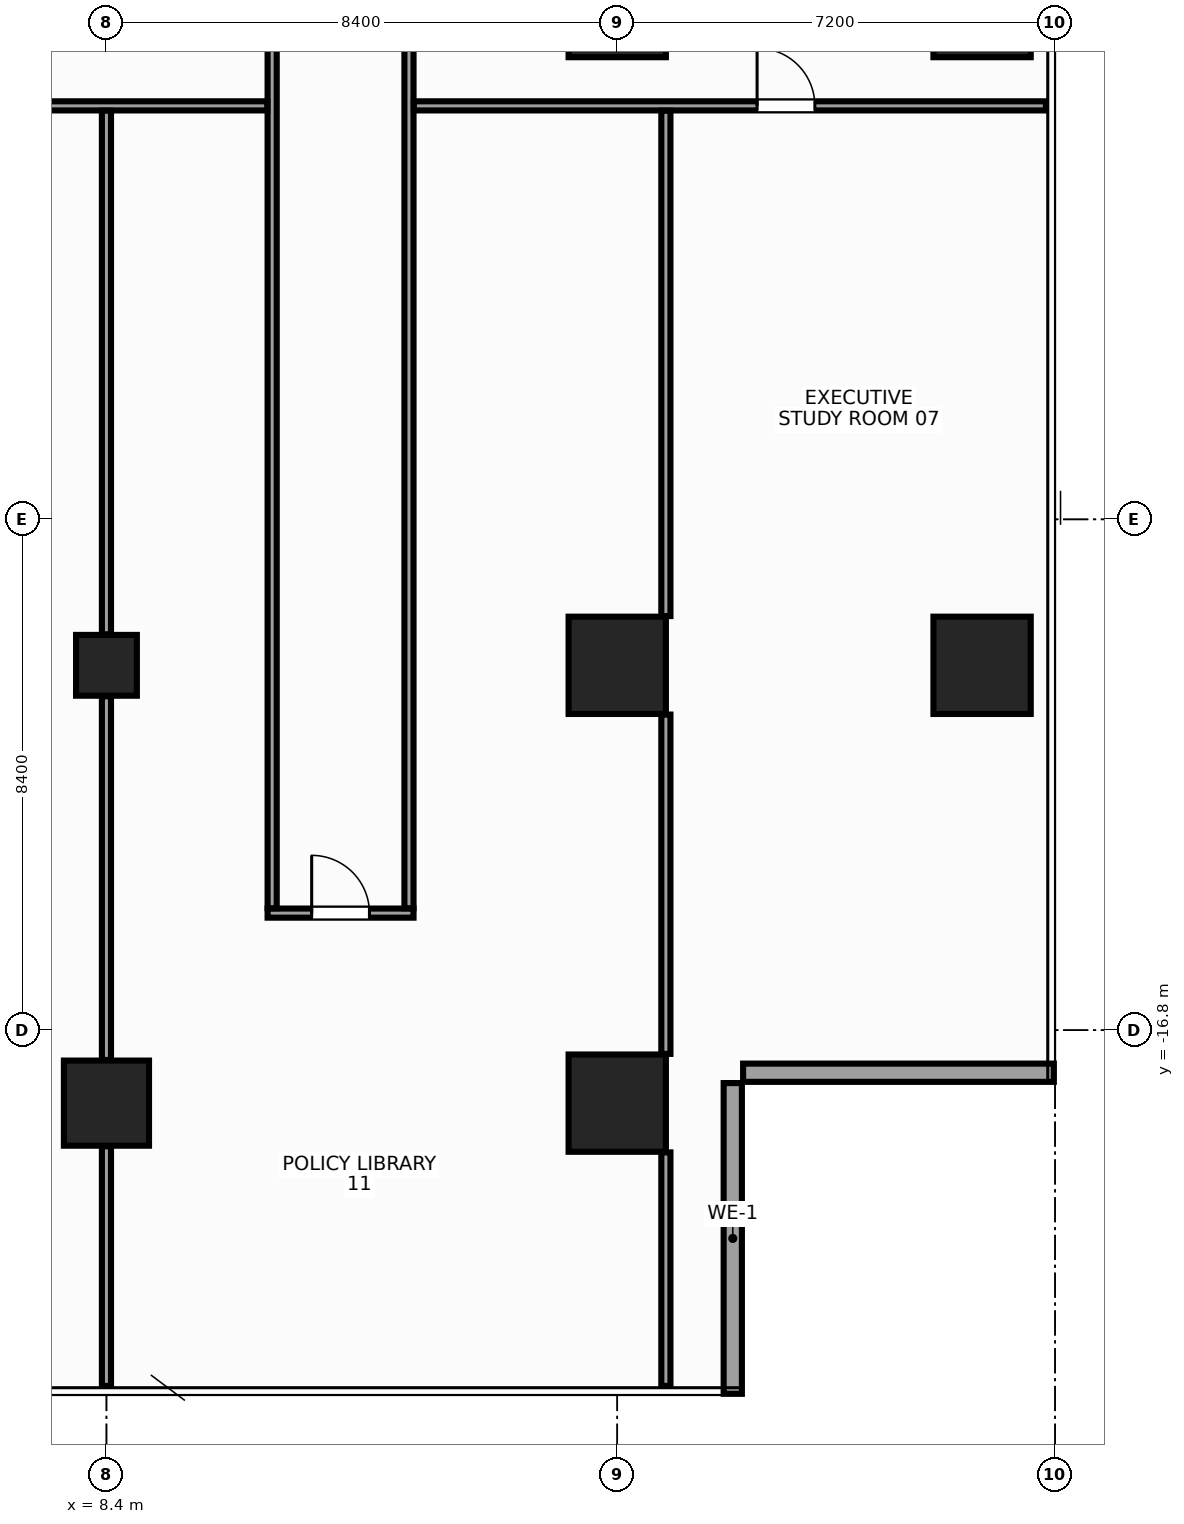
"""IFC4 building model, lengths in metres.
Left out: names, types, materials, properties, quantities, classifications, styles, units other than length and angle.
Written with IfcOpenShell. Run it as: python <this file> out.ifc"""

import sys

from ifc_helpers import new_model, si_unit, direction, frame, frame_2d, origin, origin_2d, place, context, subcontext, project, spatial, rectangle, hollow_rectangle, extrude, source, transform, mapped, element, fill, save


model = new_model("IFC4")
c1 = context("Model", 3, precision=1e-05, world=origin(), true_north=direction((0.0, 1.0)))
c2 = subcontext(c1, "Body", "Model", "MODEL_VIEW")
j1 = project(units=[si_unit("LENGTHUNIT", "METRE"), si_unit("PLANEANGLEUNIT", "RADIAN")], contexts=[c1])
p1 = place(None, origin())
s1 = spatial("IfcSite", under=j1, at=p1, CompositionType="ELEMENT")
p2 = place(p1, origin())
s2 = spatial("IfcBuilding", under=s1, at=p2, CompositionType="ELEMENT")
p3 = place(p2, frame((0.0, 0.0, 146.0)))
s3 = spatial("IfcBuildingStorey", under=s2, at=p3, CompositionType="ELEMENT", Elevation=146.0)
m1 = source(origin(), c2, "Body", "SweptSolid", [
    extrude(rectangle(XDim=1.6, YDim=1.6, at=origin_2d()), origin(), (0.0, 0.0, 1.0), 3.6),
])
for number, where, z_axis, x_axis in (
    (1, (16.8, -18.0, 0.0), (0.0, 0.0, 1.0), (1.0, 0.0, 0.0)),
    (2, (16.8, -10.8, 0.0), (0.0, 0.0, 1.0), (1.0, 0.0, 0.0)),
    (3, (16.8, 0.0, 0.0), (0.0, 0.0, 1.0), (1.0, 0.0, 0.0)),
    (4, (22.8, -10.8, 0.0), (0.0, 0.0, 1.0), (1.0, 0.0, 0.0)),
    (5, (22.8, 0.0, 0.0), (0.0, 0.0, 1.0), (1.0, 0.0, 0.0)),
):
    element("IfcColumn", number, at=place(p3, frame(where, z_axis=z_axis, x_axis=x_axis)), inside=s3, PredefinedType="COLUMN", context=c2, shape_type="MappedRepresentation", body=[
        mapped(m1, transform((0.0, 0.0, 0.0), x_axis=(1.0, 0.0, 0.0), y_axis=(0.0, 1.0, 0.0), z_axis=(0.0, 0.0, 1.0), scale=1.0)),
    ])
m2 = source(origin(), c2, "Body", "SweptSolid", [
    extrude(rectangle(XDim=1.4, YDim=1.4, at=origin_2d()), origin(), (0.0, 0.0, 1.0), 3.6),
])
p4 = place(p3, frame((8.4, -18.0, 0.0), z_axis=(0.0, 0.0, 1.0), x_axis=(1.0, 0.0, 0.0)))
e6 = element("IfcColumn", 6, at=p4, inside=s3, PredefinedType="COLUMN", context=c2, shape_type="MappedRepresentation", body=[
    mapped(m2, transform((0.0, 0.0, 0.0), x_axis=(1.0, 0.0, 0.0), y_axis=(0.0, 1.0, 0.0), z_axis=(0.0, 0.0, 1.0), scale=1.0)),
])
m3 = source(origin(), c2, "Body", "SweptSolid", [
    extrude(hollow_rectangle(XDim=1.0, YDim=1.0, WallThickness=0.045, at=origin_2d()), origin(), (0.0, 0.0, 1.0), 3.6),
])
p5 = place(p3, frame((8.4, -10.8, 0.0), z_axis=(0.0, 0.0, 1.0), x_axis=(1.0, 0.0, 0.0)))
e7 = element("IfcColumn", 7, at=p5, inside=s3, PredefinedType="COLUMN", context=c2, shape_type="MappedRepresentation", body=[
    mapped(m3, transform((0.0, 0.0, 0.0), x_axis=(1.0, 0.0, 0.0), y_axis=(0.0, 1.0, 0.0), z_axis=(0.0, 0.0, 1.0), scale=1.0)),
])
m4 = source(origin(), c2, "Body", "SweptSolid", [
    extrude(rectangle(XDim=5.11, YDim=0.3, at=frame_2d((2.555, 0.0))), origin(), (0.0, 0.0, 1.0), 2.76),
])
p6 = place(p3, frame((18.7, -22.78, 0.0), z_axis=(0.0, 0.0, 1.0), x_axis=(0.0, 1.0, 0.0)))
e8 = element("IfcWall", 8, at=p6, inside=s3, PredefinedType="STANDARD", context=c2, shape_type="MappedRepresentation", body=[
    mapped(m4, transform((0.0, 0.0, 0.0), x_axis=(1.0, 0.0, 0.0), y_axis=(0.0, 1.0, 0.0), z_axis=(0.0, 0.0, 1.0), scale=1.0)),
])
m5 = source(origin(), c2, "Body", "SweptSolid", [
    extrude(rectangle(XDim=5.11, YDim=0.3, at=frame_2d((2.555, 0.0))), origin(), (0.0, 0.0, 1.0), 2.76),
])
p7 = place(p3, frame((18.87, -17.5, 0.0), z_axis=(0.0, 0.0, 1.0), x_axis=(1.0, 0.0, 0.0)))
e9 = element("IfcWall", 9, at=p7, inside=s3, PredefinedType="STANDARD", context=c2, shape_type="MappedRepresentation", body=[
    mapped(m5, transform((0.0, 0.0, 0.0), x_axis=(1.0, 0.0, 0.0), y_axis=(0.0, 1.0, 0.0), z_axis=(0.0, 0.0, 1.0), scale=1.0)),
])
m6 = source(origin(), c2, "Body", "SweptSolid", [
    extrude(rectangle(XDim=2.4, YDim=0.15, at=frame_2d((1.2, 0.0))), origin(), (0.0, 0.0, 1.0), 3.38),
])
p8 = place(p3, frame((11.05, -14.875, 0.0), z_axis=(0.0, 0.0, 1.0), x_axis=(1.0, 0.0, 0.0)))
e10 = element("IfcWall", 10, at=p8, inside=s3, PredefinedType="PARTITIONING", context=c2, shape_type="MappedRepresentation", body=[
    mapped(m6, transform((0.0, 0.0, 0.0), x_axis=(1.0, 0.0, 0.0), y_axis=(0.0, 1.0, 0.0), z_axis=(0.0, 0.0, 1.0), scale=1.0)),
])
p9 = place(p8, frame((0.725, 0.0, 0.0)))
e11 = element("IfcOpeningElement", 11, at=p9, cuts=e10, PredefinedType="OPENING", context=c2, shape_type="SweptSolid", body=[
    extrude(rectangle(XDim=0.95, YDim=2.15, at=frame_2d((0.475, 1.075))), frame((0.0, 0.087, 0.0), z_axis=(0.0, -1.0, 0.0), x_axis=(1.0, 0.0, 0.0)), (0.0, 0.0, 1.0), 0.174),
])
m7 = source(origin(), c2, "Body", "SweptSolid", [
    extrude(rectangle(XDim=22.595, YDim=0.15, at=frame_2d((11.297, 0.0))), origin(), (0.0, 0.0, 1.0), 2.665),
])
for number, where, z_axis, x_axis in (
    (12, (11.125, -14.795, 0.0), (0.0, 0.0, 1.0), (0.0, 1.0, 0.0)),
    (13, (13.375, -14.795, 0.0), (0.0, 0.0, 1.0), (0.0, 1.0, 0.0)),
):
    element("IfcWall", number, at=place(p3, frame(where, z_axis=z_axis, x_axis=x_axis)), inside=s3, PredefinedType="PARTITIONING", context=c2, shape_type="MappedRepresentation", body=[
        mapped(m7, transform((0.0, 0.0, 0.0), x_axis=(1.0, 0.0, 0.0), y_axis=(0.0, 1.0, 0.0), z_axis=(0.0, 0.0, 1.0), scale=1.0)),
    ])
m8 = source(origin(), c2, "Body", "SweptSolid", [
    extrude(rectangle(XDim=34.895, YDim=0.15, at=frame_2d((17.448, 0.0))), origin(), (0.0, 0.0, 1.0), 2.765),
])
p10 = place(p3, frame((-23.85, -1.6, 0.0), z_axis=(0.0, 0.0, 1.0), x_axis=(1.0, 0.0, 0.0)))
e14 = element("IfcWall", 14, at=p10, inside=s3, PredefinedType="PARTITIONING", context=c2, shape_type="MappedRepresentation", body=[
    mapped(m8, transform((0.0, 0.0, 0.0), x_axis=(1.0, 0.0, 0.0), y_axis=(0.0, 1.0, 0.0), z_axis=(0.0, 0.0, 1.0), scale=1.0)),
])
p11 = place(p10, frame((3.913, 0.0, 0.0)))
e15 = element("IfcOpeningElement", 15, at=p11, cuts=e14, PredefinedType="OPENING", context=c2, shape_type="SweptSolid", body=[
    extrude(rectangle(XDim=0.95, YDim=2.15, at=frame_2d((0.475, 1.075))), frame((0.0, 0.087, 0.0), z_axis=(0.0, -1.0, 0.0), x_axis=(1.0, 0.0, 0.0)), (0.0, 0.0, 1.0), 0.174),
])
p12 = place(p10, frame((9.675, 0.0, 0.0)))
e16 = element("IfcOpeningElement", 16, at=p12, cuts=e14, PredefinedType="OPENING", context=c2, shape_type="SweptSolid", body=[
    extrude(rectangle(XDim=0.95, YDim=2.15, at=frame_2d((0.475, 1.075))), frame((0.0, 0.087, 0.0), z_axis=(0.0, -1.0, 0.0), x_axis=(1.0, 0.0, 0.0)), (0.0, 0.0, 1.0), 0.174),
])
p13 = place(p10, frame((19.175, 0.0, 0.0)))
e17 = element("IfcOpeningElement", 17, at=p13, cuts=e14, PredefinedType="OPENING", context=c2, shape_type="SweptSolid", body=[
    extrude(rectangle(XDim=0.95, YDim=2.15, at=frame_2d((0.475, 1.075))), frame((0.0, 0.087, 0.0), z_axis=(0.0, -1.0, 0.0), x_axis=(1.0, 0.0, 0.0)), (0.0, 0.0, 1.0), 0.174),
])
p14 = place(p10, frame((28.275, 0.0, 0.0)))
e18 = element("IfcOpeningElement", 18, at=p14, cuts=e14, PredefinedType="OPENING", context=c2, shape_type="SweptSolid", body=[
    extrude(rectangle(XDim=0.95, YDim=2.15, at=frame_2d((0.475, 1.075))), frame((0.0, 0.087, 0.0), z_axis=(0.0, -1.0, 0.0), x_axis=(1.0, 0.0, 0.0)), (0.0, 0.0, 1.0), 0.174),
])
m9 = source(origin(), c2, "Body", "SweptSolid", [
    extrude(rectangle(XDim=10.395, YDim=0.15, at=frame_2d((5.198, 0.0))), origin(), (0.0, 0.0, 1.0), 2.765),
])
p15 = place(p3, frame((13.455, -1.6, 0.0), z_axis=(0.0, 0.0, 1.0), x_axis=(1.0, 0.0, 0.0)))
e19 = element("IfcWall", 19, at=p15, inside=s3, PredefinedType="PARTITIONING", context=c2, shape_type="MappedRepresentation", body=[
    mapped(m9, transform((0.0, 0.0, 0.0), x_axis=(1.0, 0.0, 0.0), y_axis=(0.0, 1.0, 0.0), z_axis=(0.0, 0.0, 1.0), scale=1.0)),
])
p16 = place(p15, frame((5.645, 0.0, 0.0)))
e20 = element("IfcOpeningElement", 20, at=p16, cuts=e19, PredefinedType="OPENING", context=c2, shape_type="SweptSolid", body=[
    extrude(rectangle(XDim=0.95, YDim=2.15, at=frame_2d((0.475, 1.075))), frame((0.0, 0.087, 0.0), z_axis=(0.0, -1.0, 0.0), x_axis=(1.0, 0.0, 0.0)), (0.0, 0.0, 1.0), 0.174),
])
m10 = source(origin(), c2, "Body", "SweptSolid", [
    extrude(rectangle(XDim=3.94, YDim=0.15, at=frame_2d((1.97, 0.0))), origin(), (0.0, 0.0, 1.0), 3.38),
])
p17 = place(p3, frame((8.4, -22.65, 0.0), z_axis=(0.0, 0.0, 1.0), x_axis=(0.0, 1.0, 0.0)))
e21 = element("IfcWall", 21, at=p17, inside=s3, PredefinedType="PARTITIONING", context=c2, shape_type="MappedRepresentation", body=[
    mapped(m10, transform((0.0, 0.0, 0.0), x_axis=(1.0, 0.0, 0.0), y_axis=(0.0, 1.0, 0.0), z_axis=(0.0, 0.0, 1.0), scale=1.0)),
])
m11 = source(origin(), c2, "Body", "SweptSolid", [
    extrude(rectangle(XDim=5.98, YDim=0.15, at=frame_2d((2.99, 0.0))), origin(), (0.0, 0.0, 1.0), 2.965),
])
p18 = place(p3, frame((8.4, -17.29, 0.0), z_axis=(0.0, 0.0, 1.0), x_axis=(0.0, 1.0, 0.0)))
e22 = element("IfcWall", 22, at=p18, inside=s3, PredefinedType="PARTITIONING", context=c2, shape_type="MappedRepresentation", body=[
    mapped(m11, transform((0.0, 0.0, 0.0), x_axis=(1.0, 0.0, 0.0), y_axis=(0.0, 1.0, 0.0), z_axis=(0.0, 0.0, 1.0), scale=1.0)),
])
m12 = source(origin(), c2, "Body", "SweptSolid", [
    extrude(rectangle(XDim=8.61, YDim=0.15, at=frame_2d((4.305, 0.0))), origin(), (0.0, 0.0, 1.0), 2.765),
])
p19 = place(p3, frame((8.4, -10.29, 0.0), z_axis=(0.0, 0.0, 1.0), x_axis=(0.0, 1.0, 0.0)))
e23 = element("IfcWall", 23, at=p19, inside=s3, PredefinedType="PARTITIONING", context=c2, shape_type="MappedRepresentation", body=[
    mapped(m12, transform((0.0, 0.0, 0.0), x_axis=(1.0, 0.0, 0.0), y_axis=(0.0, 1.0, 0.0), z_axis=(0.0, 0.0, 1.0), scale=1.0)),
])
m13 = source(origin(), c2, "Body", "SweptSolid", [
    extrude(rectangle(XDim=3.84, YDim=0.15, at=frame_2d((1.92, 0.0))), origin(), (0.0, 0.0, 1.0), 3.38),
])
p20 = place(p3, frame((17.6, -22.65, 0.0), z_axis=(0.0, 0.0, 1.0), x_axis=(0.0, 1.0, 0.0)))
e24 = element("IfcWall", 24, at=p20, inside=s3, PredefinedType="PARTITIONING", context=c2, shape_type="MappedRepresentation", body=[
    mapped(m13, transform((0.0, 0.0, 0.0), x_axis=(1.0, 0.0, 0.0), y_axis=(0.0, 1.0, 0.0), z_axis=(0.0, 0.0, 1.0), scale=1.0)),
])
m14 = source(origin(), c2, "Body", "SweptSolid", [
    extrude(rectangle(XDim=5.58, YDim=0.15, at=frame_2d((2.79, 0.0))), origin(), (0.0, 0.0, 1.0), 3.38),
])
p21 = place(p3, frame((17.6, -17.19, 0.0), z_axis=(0.0, 0.0, 1.0), x_axis=(0.0, 1.0, 0.0)))
e25 = element("IfcWall", 25, at=p21, inside=s3, PredefinedType="PARTITIONING", context=c2, shape_type="MappedRepresentation", body=[
    mapped(m14, transform((0.0, 0.0, 0.0), x_axis=(1.0, 0.0, 0.0), y_axis=(0.0, 1.0, 0.0), z_axis=(0.0, 0.0, 1.0), scale=1.0)),
])
m15 = source(origin(), c2, "Body", "SweptSolid", [
    extrude(rectangle(XDim=8.31, YDim=0.15, at=frame_2d((4.155, 0.0))), origin(), (0.0, 0.0, 1.0), 3.38),
])
p22 = place(p3, frame((17.6, -9.99, 0.0), z_axis=(0.0, 0.0, 1.0), x_axis=(0.0, 1.0, 0.0)))
e26 = element("IfcWall", 26, at=p22, inside=s3, PredefinedType="PARTITIONING", context=c2, shape_type="MappedRepresentation", body=[
    mapped(m15, transform((0.0, 0.0, 0.0), x_axis=(1.0, 0.0, 0.0), y_axis=(0.0, 1.0, 0.0), z_axis=(0.0, 0.0, 1.0), scale=1.0)),
])
m16 = source(origin(), c2, "Body", "SweptSolid", [
    extrude(rectangle(XDim=0.95, YDim=2.15, at=frame_2d((0.475, 1.075))), frame((0.0, 0.025, 0.0), z_axis=(0.0, -1.0, 0.0), x_axis=(1.0, 0.0, 0.0)), (0.0, 0.0, 1.0), 0.05),
])
p23 = place(p9, origin())
e27 = element("IfcDoor", 27, at=p23, inside=s3, OperationType="SINGLE_SWING_LEFT", PredefinedType="DOOR", context=c2, shape_type="MappedRepresentation", body=[
    mapped(m16, transform((0.0, 0.0, 0.0), x_axis=(1.0, 0.0, 0.0), y_axis=(0.0, 1.0, 0.0), z_axis=(0.0, 0.0, 1.0), scale=1.0)),
])
fill(e11, e27)
p24 = place(p16, origin())
e28 = element("IfcDoor", 28, at=p24, inside=s3, OperationType="SINGLE_SWING_LEFT", PredefinedType="DOOR", context=c2, shape_type="MappedRepresentation", body=[
    mapped(m16, transform((0.0, 0.0, 0.0), x_axis=(1.0, 0.0, 0.0), y_axis=(0.0, 1.0, 0.0), z_axis=(0.0, 0.0, 1.0), scale=1.0)),
])
fill(e20, e28)
save(model, sys.argv[1])
